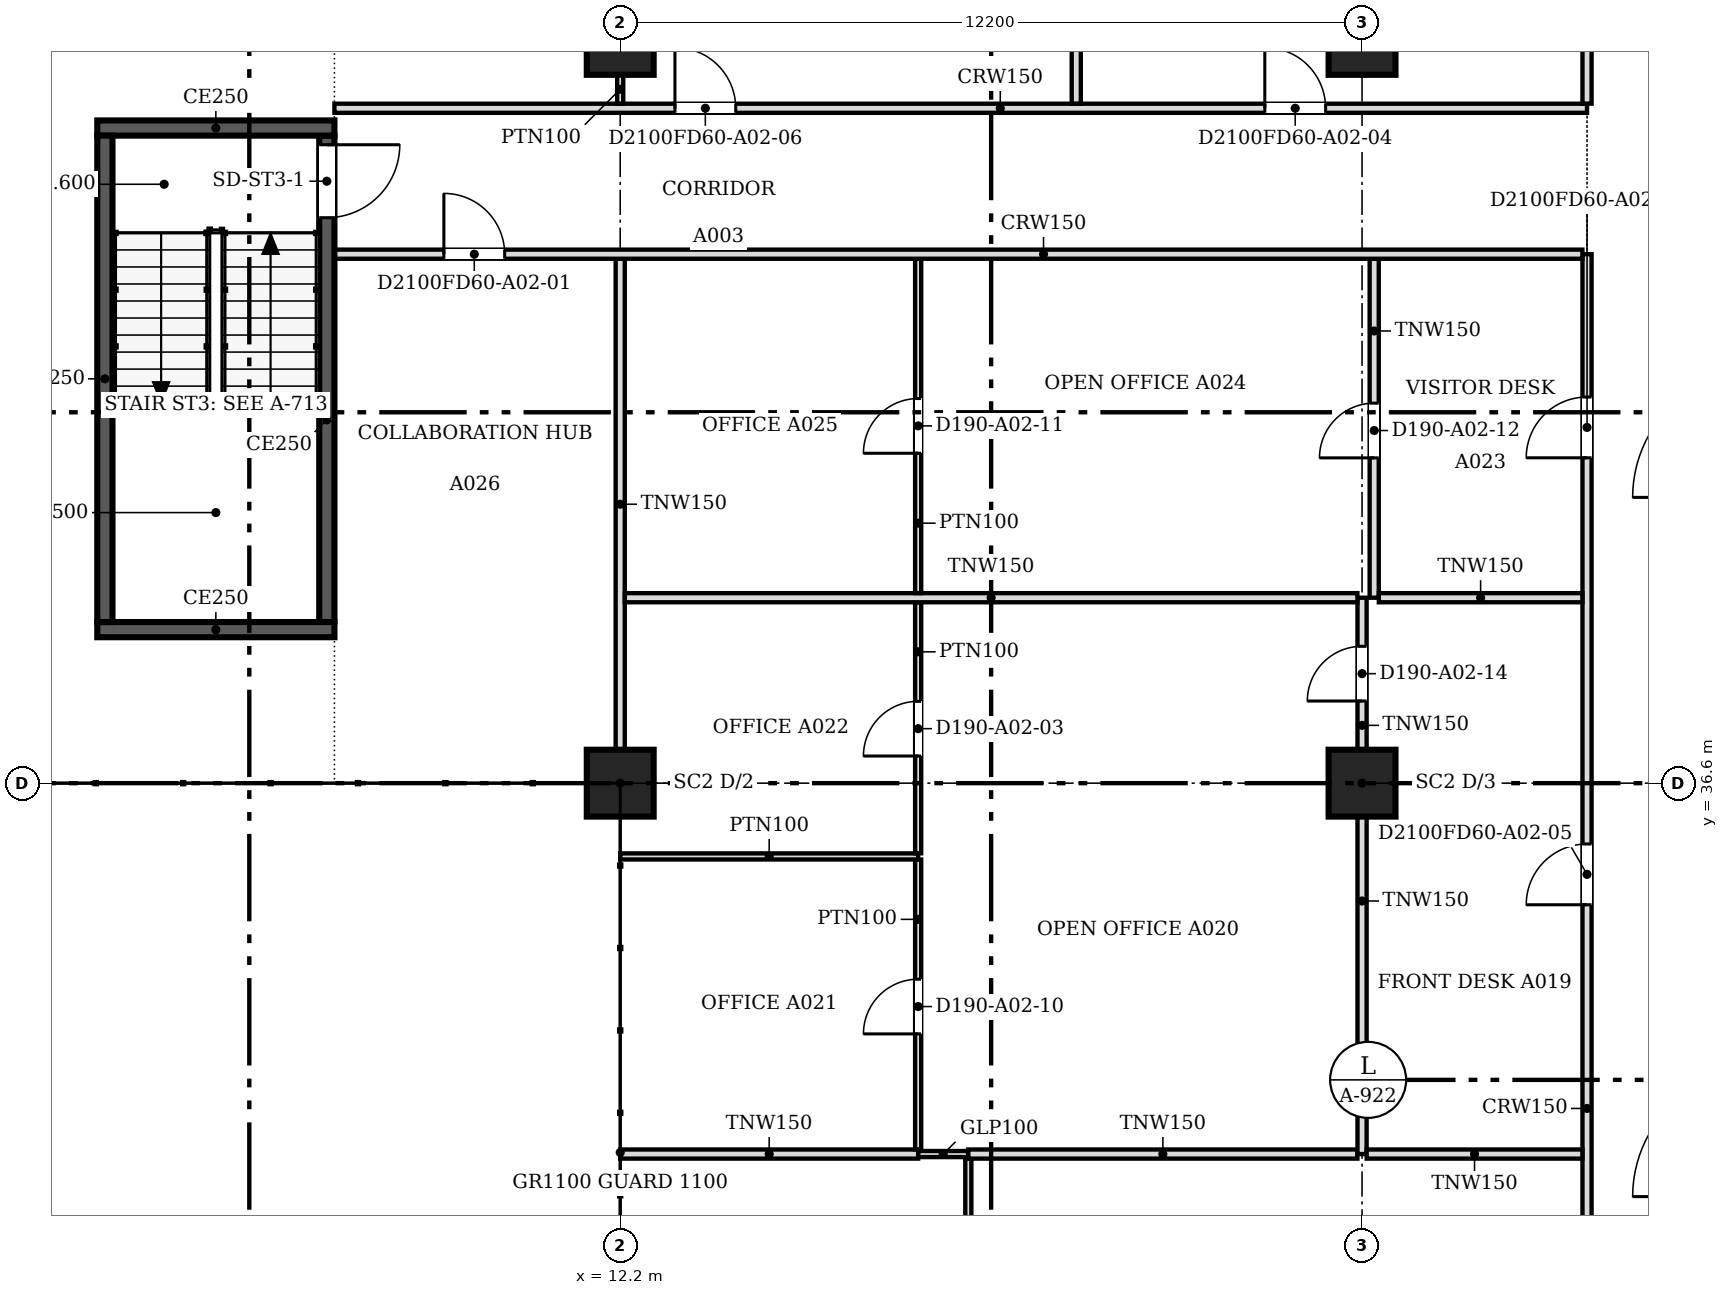
"""IFC4 building model, lengths in metres.
Left out: names, types, materials, properties, quantities, classifications, styles, units other than length and angle.
Written with IfcOpenShell. Run it as: python <this file> out.ifc"""

import sys

from ifc_helpers import new_model, si_unit, direction, frame, frame_2d, origin, origin_2d, place, context, subcontext, project, spatial, rectangle, extrude, source, transform, mapped, element, fill, save


model = new_model("IFC4")
c1 = context("Model", 3, precision=1e-05, world=origin(), true_north=direction((0.0, 1.0)))
c2 = subcontext(c1, "Body", "Model", "MODEL_VIEW")
j1 = project(units=[si_unit("LENGTHUNIT", "METRE"), si_unit("PLANEANGLEUNIT", "RADIAN")], contexts=[c1])
p1 = place(None, origin())
s1 = spatial("IfcSite", under=j1, at=p1, CompositionType="ELEMENT")
p2 = place(p1, origin())
s2 = spatial("IfcBuilding", under=s1, at=p2, CompositionType="ELEMENT")
p3 = place(p2, frame((0.0, 0.0, 25.8)))
s3 = spatial("IfcBuildingStorey", under=s2, at=p3, CompositionType="ELEMENT", Elevation=25.8)
for number, where, z_axis, x_axis in (
    (1, (12.2, 36.6, 0.0), (0.0, 0.0, 1.0), (1.0, 0.0, 0.0)),
    (2, (12.2, 48.8, 0.0), (0.0, 0.0, 1.0), (1.0, 0.0, 0.0)),
    (3, (24.4, 36.6, 0.0), (0.0, 0.0, 1.0), (1.0, 0.0, 0.0)),
    (4, (24.4, 48.8, 0.0), (0.0, 0.0, 1.0), (1.0, 0.0, 0.0)),
):
    element("IfcColumn", number, at=place(p3, frame(where, z_axis=z_axis, x_axis=x_axis)), inside=s3, PredefinedType="COLUMN", context=c2, shape_type="SweptSolid", body=[
        extrude(rectangle(XDim=1.1, YDim=1.1, at=origin_2d()), origin(), (0.0, 0.0, 1.0), 3.6),
    ])
p4 = place(p3, frame((7.5, 39.125, 0.0), z_axis=(0.0, 0.0, 1.0), x_axis=(-1.0, 0.0, 0.0)))
e5 = element("IfcWall", 5, at=p4, inside=s3, PredefinedType="SOLIDWALL", context=c2, shape_type="SweptSolid", body=[
    extrude(rectangle(XDim=3.9, YDim=0.25, at=frame_2d((1.95, 0.0))), origin(), (0.0, 0.0, 1.0), 3.8),
])
p5 = place(p3, frame((3.725, 39.25, 0.0), z_axis=(0.0, 0.0, 1.0), x_axis=(0.0, 1.0, 0.0)))
e6 = element("IfcWall", 6, at=p5, inside=s3, PredefinedType="SOLIDWALL", context=c2, shape_type="SweptSolid", body=[
    extrude(rectangle(XDim=8.0, YDim=0.25, at=frame_2d((4.0, 0.0))), origin(), (0.0, 0.0, 1.0), 3.8),
])
p6 = place(p3, frame((3.6, 47.375, 0.0), z_axis=(0.0, 0.0, 1.0), x_axis=(1.0, 0.0, 0.0)))
e7 = element("IfcWall", 7, at=p6, inside=s3, PredefinedType="SOLIDWALL", context=c2, shape_type="SweptSolid", body=[
    extrude(rectangle(XDim=3.9, YDim=0.25, at=frame_2d((1.95, 0.0))), origin(), (0.0, 0.0, 1.0), 3.8),
])
p7 = place(p3, frame((7.375, 47.25, 0.0), z_axis=(0.0, 0.0, 1.0), x_axis=(0.0, -1.0, 0.0)))
e8 = element("IfcWall", 8, at=p7, inside=s3, PredefinedType="SOLIDWALL", context=c2, shape_type="SweptSolid", body=[
    extrude(rectangle(XDim=8.0, YDim=0.25, at=frame_2d((4.0, 0.0))), origin(), (0.0, 0.0, 1.0), 3.8),
])
m1 = source(origin(), c2, "Body", "SweptSolid", [
    extrude(rectangle(XDim=1.2, YDim=2.1, at=frame_2d((0.6, 1.05))), frame((0.0, 0.135, 0.0), z_axis=(0.0, -1.0, 0.0), x_axis=(1.0, 0.0, 0.0)), (0.0, 0.0, 1.0), 0.27),
])
p8 = place(p7, frame((0.15, 0.0, 0.0)))
e9 = element("IfcOpeningElement", 9, at=p8, cuts=e8, PredefinedType="OPENING", context=c2, shape_type="MappedRepresentation", body=[
    mapped(m1, transform((0.0, 0.0, 0.0), scale=1.0)),
])
p9 = place(p3, frame((28.1, 18.8, 0.0), z_axis=(0.0, 0.0, 1.0), x_axis=(0.0, 1.0, 0.0)))
e10 = element("IfcWall", 10, at=p9, inside=s3, PredefinedType="PARTITIONING", context=c2, shape_type="SweptSolid", body=[
    extrude(rectangle(XDim=26.5, YDim=0.15, at=frame_2d((13.25, 0.0))), origin(), (0.0, 0.0, 1.0), 3.067),
])
m2 = source(origin(), c2, "Body", "SweptSolid", [
    extrude(rectangle(XDim=0.9, YDim=2.1, at=frame_2d((0.45, 1.05))), frame((0.0, 0.085, 0.0), z_axis=(0.0, -1.0, 0.0), x_axis=(1.0, 0.0, 0.0)), (0.0, 0.0, 1.0), 0.17),
])
p10 = place(p9, frame((1.1, 0.0, 0.0)))
e11 = element("IfcOpeningElement", 11, at=p10, cuts=e10, PredefinedType="OPENING", context=c2, shape_type="MappedRepresentation", body=[
    mapped(m2, transform((0.0, 0.0, 0.0), scale=1.0)),
])
m3 = source(origin(), c2, "Body", "SweptSolid", [
    extrude(rectangle(XDim=1.0, YDim=2.1, at=frame_2d((0.5, 1.05))), frame((0.0, 0.085, 0.0), z_axis=(0.0, -1.0, 0.0), x_axis=(1.0, 0.0, 0.0)), (0.0, 0.0, 1.0), 0.17),
])
p11 = place(p9, frame((23.151, 0.0, 0.0)))
e12 = element("IfcOpeningElement", 12, at=p11, cuts=e10, PredefinedType="OPENING", context=c2, shape_type="MappedRepresentation", body=[
    mapped(m3, transform((0.0, 0.0, 0.0), scale=1.0)),
])
p12 = place(p9, frame((8.2, 0.0, 0.0)))
e13 = element("IfcOpeningElement", 13, at=p12, cuts=e10, PredefinedType="OPENING", context=c2, shape_type="MappedRepresentation", body=[
    mapped(m2, transform((0.0, 0.0, 0.0), scale=1.0)),
])
p13 = place(p9, frame((15.8, 0.0, 0.0)))
e14 = element("IfcOpeningElement", 14, at=p13, cuts=e10, PredefinedType="OPENING", context=c2, shape_type="MappedRepresentation", body=[
    mapped(m3, transform((0.0, 0.0, 0.0), scale=1.0)),
])
p14 = place(p3, frame((17.925, 24.476, 0.0), z_axis=(0.0, 0.0, 1.0), x_axis=(0.0, 1.0, 0.0)))
e15 = element("IfcWall", 15, at=p14, inside=s3, PredefinedType="PARTITIONING", context=c2, shape_type="SweptSolid", body=[
    extrude(rectangle(XDim=5.948, YDim=0.1, at=frame_2d((2.974, 0.0))), origin(), (0.0, 0.0, 1.0), 3.067),
])
m4 = source(origin(), c2, "Body", "SweptSolid", [
    extrude(rectangle(XDim=0.9, YDim=2.1, at=frame_2d((0.45, 1.05))), frame((0.0, 0.06, 0.0), z_axis=(0.0, -1.0, 0.0), x_axis=(1.0, 0.0, 0.0)), (0.0, 0.0, 1.0), 0.12),
])
p15 = place(p14, frame((2.5, 0.0, 0.0)))
e16 = element("IfcOpeningElement", 16, at=p15, cuts=e15, PredefinedType="OPENING", context=c2, shape_type="MappedRepresentation", body=[
    mapped(m4, transform((0.0, 0.0, 0.0), scale=1.0)),
])
p16 = place(p3, frame((12.2, 30.5, 0.0), z_axis=(0.0, 0.0, 1.0), x_axis=(1.0, 0.0, 0.0)))
e17 = element("IfcWall", 17, at=p16, inside=s3, PredefinedType="PARTITIONING", context=c2, shape_type="SweptSolid", body=[
    extrude(rectangle(XDim=4.9, YDim=0.15, at=frame_2d((2.45, 0.0))), origin(), (0.0, 0.0, 1.0), 3.067),
])
p17 = place(p3, frame((17.101, 30.5, 0.0), z_axis=(0.0, 0.0, 1.0), x_axis=(1.0, 0.0, 0.0)))
e18 = element("IfcWall", 18, at=p17, inside=s3, PredefinedType="PARTITIONING", context=c2, shape_type="SweptSolid", body=[
    extrude(rectangle(XDim=0.823, YDim=0.1, at=frame_2d((0.412, 0.0))), origin(), (0.0, 0.0, 1.0), 3.067),
])
p18 = place(p3, frame((17.925, 30.5, 0.0), z_axis=(0.0, 0.0, 1.0), x_axis=(1.0, 0.0, 0.0)))
e19 = element("IfcWall", 19, at=p18, inside=s3, PredefinedType="PARTITIONING", context=c2, shape_type="SweptSolid", body=[
    extrude(rectangle(XDim=6.399, YDim=0.15, at=frame_2d((3.199, 0.0))), origin(), (0.0, 0.0, 1.0), 3.067),
])
p19 = place(p3, frame((24.4, 30.5, 0.0), z_axis=(0.0, 0.0, 1.0), x_axis=(0.0, 1.0, 0.0)))
e20 = element("IfcWall", 20, at=p19, inside=s3, PredefinedType="PARTITIONING", context=c2, shape_type="SweptSolid", body=[
    extrude(rectangle(XDim=5.549, YDim=0.15, at=frame_2d((2.774, 0.0))), origin(), (0.0, 0.0, 1.0), 3.067),
])
p20 = place(p3, frame((24.476, 30.5, 0.0), z_axis=(0.0, 0.0, 1.0), x_axis=(1.0, 0.0, 0.0)))
e21 = element("IfcWall", 21, at=p20, inside=s3, PredefinedType="PARTITIONING", context=c2, shape_type="SweptSolid", body=[
    extrude(rectangle(XDim=3.548, YDim=0.15, at=frame_2d((1.774, 0.0))), origin(), (0.0, 0.0, 1.0), 3.067),
])
p21 = place(p3, frame((17.1, 30.576, 0.0), z_axis=(0.0, 0.0, 1.0), x_axis=(0.0, 1.0, 0.0)))
e22 = element("IfcWall", 22, at=p21, inside=s3, PredefinedType="PARTITIONING", context=c2, shape_type="SweptSolid", body=[
    extrude(rectangle(XDim=4.768, YDim=0.1, at=frame_2d((2.384, 0.0))), origin(), (0.0, 0.0, 1.0), 3.067),
])
p22 = place(p21, frame((1.9, 0.0, 0.0)))
e23 = element("IfcOpeningElement", 23, at=p22, cuts=e22, PredefinedType="OPENING", context=c2, shape_type="MappedRepresentation", body=[
    mapped(m4, transform((0.0, 0.0, 0.0), scale=1.0)),
])
p23 = place(p3, frame((12.2, 35.395, 0.0), z_axis=(0.0, 0.0, 1.0), x_axis=(1.0, 0.0, 0.0)))
e24 = element("IfcWall", 24, at=p23, inside=s3, PredefinedType="PARTITIONING", context=c2, shape_type="SweptSolid", body=[
    extrude(rectangle(XDim=4.9, YDim=0.1, at=frame_2d((2.45, 0.0))), origin(), (0.0, 0.0, 1.0), 3.067),
])
p24 = place(p3, frame((17.1, 35.446, 0.0), z_axis=(0.0, 0.0, 1.0), x_axis=(0.0, 1.0, 0.0)))
e25 = element("IfcWall", 25, at=p24, inside=s3, PredefinedType="PARTITIONING", context=c2, shape_type="SweptSolid", body=[
    extrude(rectangle(XDim=4.128, YDim=0.1, at=frame_2d((2.064, 0.0))), origin(), (0.0, 0.0, 1.0), 3.067),
])
p25 = place(p24, frame((1.6, 0.0, 0.0)))
e26 = element("IfcOpeningElement", 26, at=p25, cuts=e25, PredefinedType="OPENING", context=c2, shape_type="MappedRepresentation", body=[
    mapped(m4, transform((0.0, 0.0, 0.0), scale=1.0)),
])
p26 = place(p3, frame((12.2, 37.151, 0.0), z_axis=(0.0, 0.0, 1.0), x_axis=(0.0, 1.0, 0.0)))
e27 = element("IfcWall", 27, at=p26, inside=s3, PredefinedType="PARTITIONING", context=c2, shape_type="SweptSolid", body=[
    extrude(rectangle(XDim=8.073, YDim=0.15, at=frame_2d((4.037, 0.0))), origin(), (0.0, 0.0, 1.0), 3.067),
])
p27 = place(p3, frame((24.4, 37.151, 0.0), z_axis=(0.0, 0.0, 1.0), x_axis=(0.0, 1.0, 0.0)))
e28 = element("IfcWall", 28, at=p27, inside=s3, PredefinedType="PARTITIONING", context=c2, shape_type="SweptSolid", body=[
    extrude(rectangle(XDim=2.499, YDim=0.15, at=frame_2d((1.25, 0.0))), origin(), (0.0, 0.0, 1.0), 3.067),
])
p28 = place(p27, frame((0.8, 0.0, 0.0)))
e29 = element("IfcOpeningElement", 29, at=p28, cuts=e28, PredefinedType="OPENING", context=c2, shape_type="MappedRepresentation", body=[
    mapped(m2, transform((0.0, 0.0, 0.0), scale=1.0)),
])
p29 = place(p3, frame((12.276, 39.65, 0.0), z_axis=(0.0, 0.0, 1.0), x_axis=(1.0, 0.0, 0.0)))
e30 = element("IfcWall", 30, at=p29, inside=s3, PredefinedType="PARTITIONING", context=c2, shape_type="SweptSolid", body=[
    extrude(rectangle(XDim=12.048, YDim=0.15, at=frame_2d((6.024, 0.0))), origin(), (0.0, 0.0, 1.0), 3.067),
])
p30 = place(p3, frame((24.6, 39.65, 0.0), z_axis=(0.0, 0.0, 1.0), x_axis=(0.0, 1.0, 0.0)))
e31 = element("IfcWall", 31, at=p30, inside=s3, PredefinedType="PARTITIONING", context=c2, shape_type="SweptSolid", body=[
    extrude(rectangle(XDim=5.574, YDim=0.15, at=frame_2d((2.787, 0.0))), origin(), (0.0, 0.0, 1.0), 3.067),
])
p31 = place(p30, frame((2.3, 0.0, 0.0)))
e32 = element("IfcOpeningElement", 32, at=p31, cuts=e31, PredefinedType="OPENING", context=c2, shape_type="MappedRepresentation", body=[
    mapped(m2, transform((0.0, 0.0, 0.0), scale=1.0)),
])
p32 = place(p3, frame((24.676, 39.65, 0.0), z_axis=(0.0, 0.0, 1.0), x_axis=(1.0, 0.0, 0.0)))
e33 = element("IfcWall", 33, at=p32, inside=s3, PredefinedType="PARTITIONING", context=c2, shape_type="SweptSolid", body=[
    extrude(rectangle(XDim=3.348, YDim=0.15, at=frame_2d((1.674, 0.0))), origin(), (0.0, 0.0, 1.0), 3.067),
])
p33 = place(p3, frame((17.1, 39.726, 0.0), z_axis=(0.0, 0.0, 1.0), x_axis=(0.0, 1.0, 0.0)))
e34 = element("IfcWall", 34, at=p33, inside=s3, PredefinedType="PARTITIONING", context=c2, shape_type="SweptSolid", body=[
    extrude(rectangle(XDim=5.498, YDim=0.1, at=frame_2d((2.749, 0.0))), origin(), (0.0, 0.0, 1.0), 3.067),
])
p34 = place(p33, frame((2.3, 0.0, 0.0)))
e35 = element("IfcOpeningElement", 35, at=p34, cuts=e34, PredefinedType="OPENING", context=c2, shape_type="MappedRepresentation", body=[
    mapped(m4, transform((0.0, 0.0, 0.0), scale=1.0)),
])
p35 = place(p3, frame((28.024, 45.3, 0.0), z_axis=(0.0, 0.0, 1.0), x_axis=(-1.0, 0.0, 0.0)))
e36 = element("IfcWall", 36, at=p35, inside=s3, PredefinedType="PARTITIONING", context=c2, shape_type="SweptSolid", body=[
    extrude(rectangle(XDim=20.524, YDim=0.15, at=frame_2d((10.262, 0.0))), origin(), (0.0, 0.0, 1.0), 3.067),
])
p36 = place(p35, frame((17.724, 0.0, 0.0)))
e37 = element("IfcOpeningElement", 37, at=p36, cuts=e36, PredefinedType="OPENING", context=c2, shape_type="MappedRepresentation", body=[
    mapped(m3, transform((0.0, 0.0, 0.0), scale=1.0)),
])
p37 = place(p3, frame((7.5, 47.7, 0.0), z_axis=(0.0, 0.0, 1.0), x_axis=(1.0, 0.0, 0.0)))
e38 = element("IfcWall", 38, at=p37, inside=s3, PredefinedType="PARTITIONING", context=c2, shape_type="SweptSolid", body=[
    extrude(rectangle(XDim=20.6, YDim=0.15, at=frame_2d((10.3, 0.0))), origin(), (0.0, 0.0, 1.0), 3.067),
])
p38 = place(p37, frame((15.301, 0.0, 0.0)))
e39 = element("IfcOpeningElement", 39, at=p38, cuts=e38, PredefinedType="OPENING", context=c2, shape_type="MappedRepresentation", body=[
    mapped(m3, transform((0.0, 0.0, 0.0), scale=1.0)),
])
p39 = place(p37, frame((5.6, 0.0, 0.0)))
e40 = element("IfcOpeningElement", 40, at=p39, cuts=e38, PredefinedType="OPENING", context=c2, shape_type="MappedRepresentation", body=[
    mapped(m3, transform((0.0, 0.0, 0.0), scale=1.0)),
])
p40 = place(p3, frame((19.7, 47.776, 0.0), z_axis=(0.0, 0.0, 1.0), x_axis=(0.0, 1.0, 0.0)))
e41 = element("IfcWall", 41, at=p40, inside=s3, PredefinedType="PARTITIONING", context=c2, shape_type="SweptSolid", body=[
    extrude(rectangle(XDim=3.198, YDim=0.15, at=frame_2d((1.599, 0.0))), origin(), (0.0, 0.0, 1.0), 3.067),
])
p41 = place(p3, frame((28.1, 47.776, 0.0), z_axis=(0.0, 0.0, 1.0), x_axis=(0.0, 1.0, 0.0)))
e42 = element("IfcWall", 42, at=p41, inside=s3, PredefinedType="PARTITIONING", context=c2, shape_type="SweptSolid", body=[
    extrude(rectangle(XDim=3.274, YDim=0.15, at=frame_2d((1.637, 0.0))), origin(), (0.0, 0.0, 1.0), 3.067),
])
p42 = place(p3, frame((12.2, 48.25, 0.0), z_axis=(0.0, 0.0, 1.0), x_axis=(0.0, -1.0, 0.0)))
e43 = element("IfcWall", 43, at=p42, inside=s3, PredefinedType="PARTITIONING", context=c2, shape_type="SweptSolid", body=[
    extrude(rectangle(XDim=0.475, YDim=0.1, at=frame_2d((0.238, 0.0))), origin(), (0.0, 0.0, 1.0), 3.067),
])
m5 = source(origin(), c2, "Body", "SweptSolid", [
    extrude(rectangle(XDim=1.2, YDim=2.1, at=frame_2d((0.6, 1.05))), frame((0.0, 0.025, 0.0), z_axis=(0.0, -1.0, 0.0), x_axis=(1.0, 0.0, 0.0)), (0.0, 0.0, 1.0), 0.05),
])
p43 = place(p8, origin())
e44 = element("IfcDoor", 44, at=p43, inside=s3, OperationType="SINGLE_SWING_LEFT", PredefinedType="DOOR", context=c2, shape_type="MappedRepresentation", body=[
    mapped(m5, transform((0.0, 0.0, 0.0), scale=1.0)),
])
fill(e9, e44)
m6 = source(origin(), c2, "Body", "SweptSolid", [
    extrude(rectangle(XDim=0.9, YDim=2.1, at=frame_2d((0.45, 1.05))), frame((0.0, 0.025, 0.0), z_axis=(0.0, -1.0, 0.0), x_axis=(1.0, 0.0, 0.0)), (0.0, 0.0, 1.0), 0.05),
])
p44 = place(p25, origin())
e45 = element("IfcDoor", 45, at=p44, inside=s3, OperationType="SINGLE_SWING_LEFT", PredefinedType="DOOR", context=c2, shape_type="MappedRepresentation", body=[
    mapped(m6, transform((0.0, 0.0, 0.0), scale=1.0)),
])
fill(e26, e45)
m7 = source(origin(), c2, "Body", "SweptSolid", [
    extrude(rectangle(XDim=1.0, YDim=2.1, at=frame_2d((0.5, 1.05))), frame((0.0, 0.025, 0.0), z_axis=(0.0, -1.0, 0.0), x_axis=(1.0, 0.0, 0.0)), (0.0, 0.0, 1.0), 0.05),
])
p45 = place(p36, origin())
e46 = element("IfcDoor", 46, at=p45, inside=s3, OperationType="SINGLE_SWING_RIGHT", PredefinedType="DOOR", context=c2, shape_type="MappedRepresentation", body=[
    mapped(m7, transform((0.0, 0.0, 0.0), scale=1.0)),
])
fill(e37, e46)
p46 = place(p22, origin())
e47 = element("IfcDoor", 47, at=p46, inside=s3, OperationType="SINGLE_SWING_LEFT", PredefinedType="DOOR", context=c2, shape_type="MappedRepresentation", body=[
    mapped(m6, transform((0.0, 0.0, 0.0), scale=1.0)),
])
fill(e23, e47)
p47 = place(p34, origin())
e48 = element("IfcDoor", 48, at=p47, inside=s3, OperationType="SINGLE_SWING_LEFT", PredefinedType="DOOR", context=c2, shape_type="MappedRepresentation", body=[
    mapped(m6, transform((0.0, 0.0, 0.0), scale=1.0)),
])
fill(e35, e48)
p48 = place(p31, origin())
e49 = element("IfcDoor", 49, at=p48, inside=s3, OperationType="SINGLE_SWING_LEFT", PredefinedType="DOOR", context=c2, shape_type="MappedRepresentation", body=[
    mapped(m6, transform((0.0, 0.0, 0.0), scale=1.0)),
])
fill(e32, e49)
p49 = place(p11, origin())
e50 = element("IfcDoor", 50, at=p49, inside=s3, OperationType="SINGLE_SWING_LEFT", PredefinedType="DOOR", context=c2, shape_type="MappedRepresentation", body=[
    mapped(m7, transform((0.0, 0.0, 0.0), scale=1.0)),
])
fill(e12, e50)
p50 = place(p28, origin())
e51 = element("IfcDoor", 51, at=p50, inside=s3, OperationType="SINGLE_SWING_LEFT", PredefinedType="DOOR", context=c2, shape_type="MappedRepresentation", body=[
    mapped(m6, transform((0.0, 0.0, 0.0), scale=1.0)),
])
fill(e29, e51)
p51 = place(p38, origin())
e52 = element("IfcDoor", 52, at=p51, inside=s3, OperationType="SINGLE_SWING_LEFT", PredefinedType="DOOR", context=c2, shape_type="MappedRepresentation", body=[
    mapped(m7, transform((0.0, 0.0, 0.0), scale=1.0)),
])
fill(e39, e52)
p52 = place(p13, origin())
e53 = element("IfcDoor", 53, at=p52, inside=s3, OperationType="SINGLE_SWING_LEFT", PredefinedType="DOOR", context=c2, shape_type="MappedRepresentation", body=[
    mapped(m7, transform((0.0, 0.0, 0.0), scale=1.0)),
])
fill(e14, e53)
p53 = place(p39, origin())
e54 = element("IfcDoor", 54, at=p53, inside=s3, OperationType="SINGLE_SWING_LEFT", PredefinedType="DOOR", context=c2, shape_type="MappedRepresentation", body=[
    mapped(m7, transform((0.0, 0.0, 0.0), scale=1.0)),
])
fill(e40, e54)
save(model, sys.argv[1])
